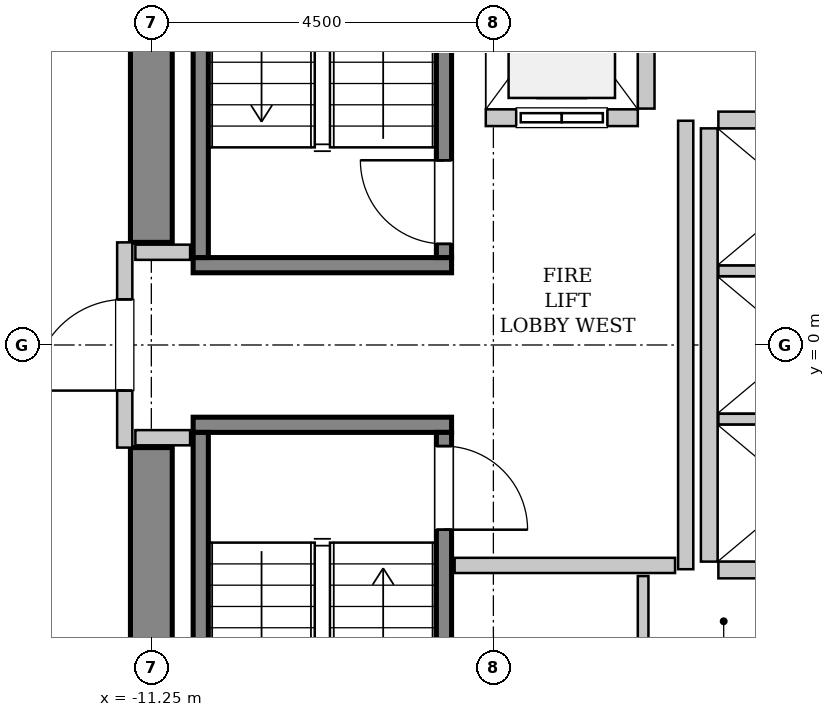
"""IFC4 building model, lengths in metres.
Left out: names, types, materials, properties, quantities, classifications, styles, units other than length and angle.
Written with IfcOpenShell. Run it as: python <this file> out.ifc"""

import sys

from ifc_helpers import new_model, si_unit, direction, frame, frame_2d, origin, place, context, subcontext, project, spatial, rectangle, extrude, source, transform, mapped, element, fill, save


model = new_model("IFC4")
c1 = context("Model", 3, precision=1e-05, world=origin(), true_north=direction((0.0, 1.0)))
c2 = subcontext(c1, "Body", "Model", "MODEL_VIEW")
j1 = project(units=[si_unit("LENGTHUNIT", "METRE"), si_unit("PLANEANGLEUNIT", "RADIAN")], contexts=[c1])
p1 = place(None, origin())
s1 = spatial("IfcSite", under=j1, at=p1, CompositionType="ELEMENT")
p2 = place(p1, origin())
s2 = spatial("IfcBuilding", under=s1, at=p2, CompositionType="ELEMENT")
p3 = place(p2, frame((0.0, 0.0, 179.2)))
s3 = spatial("IfcBuildingStorey", under=s2, at=p3, CompositionType="ELEMENT", Elevation=179.2)
m1 = source(origin(), c2, "Body", "SweptSolid", [
    extrude(rectangle(XDim=7.375, YDim=0.55, at=frame_2d((3.688, 0.0))), origin(), (0.0, 0.0, 1.0), 3.8),
])
for number, where, z_axis, x_axis in (
    (1, (-11.25, -8.725, 0.0), (0.0, 0.0, 1.0), (0.0, 1.0, 0.0)),
    (2, (-11.25, 1.35, 0.0), (0.0, 0.0, 1.0), (0.0, 1.0, 0.0)),
):
    element("IfcWall", number, at=place(p3, frame(where, z_axis=z_axis, x_axis=x_axis)), inside=s3, PredefinedType="SHEAR", context=c2, shape_type="MappedRepresentation", body=[
        mapped(m1, transform((0.0, 0.0, 0.0), x_axis=(1.0, 0.0, 0.0), y_axis=(0.0, 1.0, 0.0), z_axis=(0.0, 0.0, 1.0), scale=1.0)),
    ])
m2 = source(origin(), c2, "Body", "SweptSolid", [
    extrude(rectangle(XDim=3.4, YDim=0.2, at=frame_2d((1.7, 0.0))), origin(), (0.0, 0.0, 1.0), 3.8),
])
p4 = place(p3, frame((-7.3, 1.05, 0.0), z_axis=(0.0, 0.0, 1.0), x_axis=(-1.0, 0.0, 0.0)))
e3 = element("IfcWall", 3, at=p4, inside=s3, PredefinedType="SOLIDWALL", context=c2, shape_type="MappedRepresentation", body=[
    mapped(m2, transform((0.0, 0.0, 0.0), x_axis=(1.0, 0.0, 0.0), y_axis=(0.0, 1.0, 0.0), z_axis=(0.0, 0.0, 1.0), scale=1.0)),
])
m3 = source(origin(), c2, "Body", "SweptSolid", [
    extrude(rectangle(XDim=7.1, YDim=0.2, at=frame_2d((3.55, 0.0))), origin(), (0.0, 0.0, 1.0), 3.8),
])
p5 = place(p3, frame((-7.4, 1.15, 0.0), z_axis=(0.0, 0.0, 1.0), x_axis=(0.0, 1.0, 0.0)))
e4 = element("IfcWall", 4, at=p5, inside=s3, PredefinedType="SOLIDWALL", context=c2, shape_type="MappedRepresentation", body=[
    mapped(m3, transform((0.0, 0.0, 0.0), x_axis=(1.0, 0.0, 0.0), y_axis=(0.0, 1.0, 0.0), z_axis=(0.0, 0.0, 1.0), scale=1.0)),
])
p6 = place(p5, frame((0.18, 0.0, 0.0)))
e5 = element("IfcOpeningElement", 5, at=p6, cuts=e4, PredefinedType="OPENING", context=c2, shape_type="SweptSolid", body=[
    extrude(rectangle(XDim=1.1, YDim=2.15, at=frame_2d((0.55, 1.075))), frame((0.0, 0.11, 0.0), z_axis=(0.0, -1.0, 0.0), x_axis=(1.0, 0.0, 0.0)), (0.0, 0.0, 1.0), 0.22),
])
p7 = place(p3, frame((-10.6, 1.15, 0.0), z_axis=(0.0, 0.0, 1.0), x_axis=(0.0, 1.0, 0.0)))
e6 = element("IfcWall", 6, at=p7, inside=s3, PredefinedType="SOLIDWALL", context=c2, shape_type="MappedRepresentation", body=[
    mapped(m3, transform((0.0, 0.0, 0.0), x_axis=(1.0, 0.0, 0.0), y_axis=(0.0, 1.0, 0.0), z_axis=(0.0, 0.0, 1.0), scale=1.0)),
])
p8 = place(p3, frame((-10.7, -1.05, 0.0), z_axis=(0.0, 0.0, 1.0), x_axis=(1.0, 0.0, 0.0)))
e7 = element("IfcWall", 7, at=p8, inside=s3, PredefinedType="SOLIDWALL", context=c2, shape_type="MappedRepresentation", body=[
    mapped(m2, transform((0.0, 0.0, 0.0), x_axis=(1.0, 0.0, 0.0), y_axis=(0.0, 1.0, 0.0), z_axis=(0.0, 0.0, 1.0), scale=1.0)),
])
p9 = place(p3, frame((-10.6, -1.15, 0.0), z_axis=(0.0, 0.0, 1.0), x_axis=(0.0, -1.0, 0.0)))
e8 = element("IfcWall", 8, at=p9, inside=s3, PredefinedType="SOLIDWALL", context=c2, shape_type="MappedRepresentation", body=[
    mapped(m3, transform((0.0, 0.0, 0.0), x_axis=(1.0, 0.0, 0.0), y_axis=(0.0, 1.0, 0.0), z_axis=(0.0, 0.0, 1.0), scale=1.0)),
])
p10 = place(p3, frame((-7.4, -1.15, 0.0), z_axis=(0.0, 0.0, 1.0), x_axis=(0.0, -1.0, 0.0)))
e9 = element("IfcWall", 9, at=p10, inside=s3, PredefinedType="SOLIDWALL", context=c2, shape_type="MappedRepresentation", body=[
    mapped(m3, transform((0.0, 0.0, 0.0), x_axis=(1.0, 0.0, 0.0), y_axis=(0.0, 1.0, 0.0), z_axis=(0.0, 0.0, 1.0), scale=1.0)),
])
p11 = place(p10, frame((0.18, 0.0, 0.0)))
e10 = element("IfcOpeningElement", 10, at=p11, cuts=e9, PredefinedType="OPENING", context=c2, shape_type="SweptSolid", body=[
    extrude(rectangle(XDim=1.1, YDim=2.15, at=frame_2d((0.55, 1.075))), frame((0.0, 0.11, 0.0), z_axis=(0.0, -1.0, 0.0), x_axis=(1.0, 0.0, 0.0)), (0.0, 0.0, 1.0), 0.22),
])
m4 = source(origin(), c2, "Body", "SweptSolid", [
    extrude(rectangle(XDim=2.0, YDim=0.22, at=frame_2d((1.0, 0.0))), origin(), (0.0, 0.0, 1.0), 3.535),
])
p12 = place(p3, frame((-6.85, 2.99, 0.0), z_axis=(0.0, 0.0, 1.0), x_axis=(1.0, 0.0, 0.0)))
e11 = element("IfcWall", 11, at=p12, inside=s3, PredefinedType="SOLIDWALL", context=c2, shape_type="MappedRepresentation", body=[
    mapped(m4, transform((0.0, 0.0, 0.0), x_axis=(1.0, 0.0, 0.0), y_axis=(0.0, 1.0, 0.0), z_axis=(0.0, 0.0, 1.0), scale=1.0)),
])
p13 = place(p12, frame((0.4, 0.0, 0.0)))
e12 = element("IfcOpeningElement", 12, at=p13, cuts=e11, PredefinedType="OPENING", context=c2, shape_type="SweptSolid", body=[
    extrude(rectangle(XDim=1.2, YDim=2.2, at=frame_2d((0.6, 1.1))), frame((0.0, 0.12, 0.0), z_axis=(0.0, -1.0, 0.0), x_axis=(1.0, 0.0, 0.0)), (0.0, 0.0, 1.0), 0.24),
])
m5 = source(origin(), c2, "Body", "SweptSolid", [
    extrude(rectangle(XDim=2.68, YDim=0.22, at=frame_2d((1.34, 0.0))), origin(), (0.0, 0.0, 1.0), 3.535),
])
p14 = place(p3, frame((-4.74, 3.11, 0.0), z_axis=(0.0, 0.0, 1.0), x_axis=(0.0, 1.0, 0.0)))
e13 = element("IfcWall", 13, at=p14, inside=s3, PredefinedType="SOLIDWALL", context=c2, shape_type="MappedRepresentation", body=[
    mapped(m5, transform((0.0, 0.0, 0.0), x_axis=(1.0, 0.0, 0.0), y_axis=(0.0, 1.0, 0.0), z_axis=(0.0, 0.0, 1.0), scale=1.0)),
])
m6 = source(origin(), c2, "Body", "SweptSolid", [
    extrude(rectangle(XDim=5.7, YDim=0.22, at=frame_2d((2.85, 0.0))), origin(), (0.0, 0.0, 1.0), 3.535),
])
p15 = place(p3, frame((-3.91, 2.85, 0.0), z_axis=(0.0, 0.0, 1.0), x_axis=(0.0, -1.0, 0.0)))
e14 = element("IfcWall", 14, at=p15, inside=s3, PredefinedType="SOLIDWALL", context=c2, shape_type="MappedRepresentation", body=[
    mapped(m6, transform((0.0, 0.0, 0.0), x_axis=(1.0, 0.0, 0.0), y_axis=(0.0, 1.0, 0.0), z_axis=(0.0, 0.0, 1.0), scale=1.0)),
])
m7 = source(origin(), c2, "Body", "SweptSolid", [
    extrude(rectangle(XDim=2.13, YDim=0.22, at=frame_2d((1.065, 0.0))), origin(), (0.0, 0.0, 1.0), 3.535),
])
p16 = place(p3, frame((-3.79, -2.96, 0.0), z_axis=(0.0, 0.0, 1.0), x_axis=(1.0, 0.0, 0.0)))
e15 = element("IfcWall", 15, at=p16, inside=s3, PredefinedType="SOLIDWALL", context=c2, shape_type="MappedRepresentation", body=[
    mapped(m7, transform((0.0, 0.0, 0.0), x_axis=(1.0, 0.0, 0.0), y_axis=(0.0, 1.0, 0.0), z_axis=(0.0, 0.0, 1.0), scale=1.0)),
])
m8 = source(origin(), c2, "Body", "SweptSolid", [
    extrude(rectangle(XDim=2.13, YDim=0.14, at=frame_2d((1.065, 0.0))), origin(), (0.0, 0.0, 1.0), 3.535),
])
for number, where, z_axis, x_axis in (
    (16, (-3.79, -0.975, 0.0), (0.0, 0.0, 1.0), (1.0, 0.0, 0.0)),
    (17, (-3.79, 0.975, 0.0), (0.0, 0.0, 1.0), (1.0, 0.0, 0.0)),
):
    element("IfcWall", number, at=place(p3, frame(where, z_axis=z_axis, x_axis=x_axis)), inside=s3, PredefinedType="PARTITIONING", context=c2, shape_type="MappedRepresentation", body=[
        mapped(m8, transform((0.0, 0.0, 0.0), x_axis=(1.0, 0.0, 0.0), y_axis=(0.0, 1.0, 0.0), z_axis=(0.0, 0.0, 1.0), scale=1.0)),
    ])
p17 = place(p3, frame((-1.66, 2.96, 0.0), z_axis=(0.0, 0.0, 1.0), x_axis=(-1.0, 0.0, 0.0)))
e18 = element("IfcWall", 18, at=p17, inside=s3, PredefinedType="SOLIDWALL", context=c2, shape_type="MappedRepresentation", body=[
    mapped(m7, transform((0.0, 0.0, 0.0), x_axis=(1.0, 0.0, 0.0), y_axis=(0.0, 1.0, 0.0), z_axis=(0.0, 0.0, 1.0), scale=1.0)),
])
m9 = source(origin(), c2, "Body", "SweptSolid", [
    extrude(rectangle(XDim=2.7, YDim=0.2, at=frame_2d((1.35, 0.0))), origin(), (0.0, 0.0, 1.0), 2.425),
])
p18 = place(p3, frame((-11.6, -1.35, 0.0), z_axis=(0.0, 0.0, 1.0), x_axis=(0.0, 1.0, 0.0)))
e19 = element("IfcWall", 19, at=p18, inside=s3, PredefinedType="PARTITIONING", context=c2, shape_type="MappedRepresentation", body=[
    mapped(m9, transform((0.0, 0.0, 0.0), x_axis=(1.0, 0.0, 0.0), y_axis=(0.0, 1.0, 0.0), z_axis=(0.0, 0.0, 1.0), scale=1.0)),
])
p19 = place(p18, frame((0.75, 0.0, 0.0)))
e20 = element("IfcOpeningElement", 20, at=p19, cuts=e19, PredefinedType="OPENING", context=c2, shape_type="SweptSolid", body=[
    extrude(rectangle(XDim=1.2, YDim=2.15, at=frame_2d((0.6, 1.075))), frame((0.0, 0.11, 0.0), z_axis=(0.0, -1.0, 0.0), x_axis=(1.0, 0.0, 0.0)), (0.0, 0.0, 1.0), 0.22),
])
m10 = source(origin(), c2, "Body", "SweptSolid", [
    extrude(rectangle(XDim=5.9, YDim=0.2, at=frame_2d((2.95, 0.0))), origin(), (0.0, 0.0, 1.0), 3.535),
])
p20 = place(p3, frame((-4.22, -2.95, 0.0), z_axis=(0.0, 0.0, 1.0), x_axis=(0.0, 1.0, 0.0)))
e21 = element("IfcWall", 21, at=p20, inside=s3, PredefinedType="PARTITIONING", context=c2, shape_type="MappedRepresentation", body=[
    mapped(m10, transform((0.0, 0.0, 0.0), x_axis=(1.0, 0.0, 0.0), y_axis=(0.0, 1.0, 0.0), z_axis=(0.0, 0.0, 1.0), scale=1.0)),
])
m11 = source(origin(), c2, "Body", "SweptSolid", [
    extrude(rectangle(XDim=2.9, YDim=0.2, at=frame_2d((1.45, 0.0))), origin(), (0.0, 0.0, 1.0), 3.535),
])
p21 = place(p3, frame((-7.26, -2.9, 0.0), z_axis=(0.0, 0.0, 1.0), x_axis=(1.0, 0.0, 0.0)))
e22 = element("IfcWall", 22, at=p21, inside=s3, PredefinedType="PARTITIONING", context=c2, shape_type="MappedRepresentation", body=[
    mapped(m11, transform((0.0, 0.0, 0.0), x_axis=(1.0, 0.0, 0.0), y_axis=(0.0, 1.0, 0.0), z_axis=(0.0, 0.0, 1.0), scale=1.0)),
])
m12 = source(origin(), c2, "Body", "SweptSolid", [
    extrude(rectangle(XDim=0.72, YDim=0.2, at=frame_2d((0.36, 0.0))), origin(), (0.0, 0.0, 1.0), 3.535),
])
for number, where, z_axis, x_axis in (
    (23, (-11.46, 1.22, 0.0), (0.0, 0.0, 1.0), (1.0, 0.0, 0.0)),
    (24, (-11.46, -1.22, 0.0), (0.0, 0.0, 1.0), (1.0, 0.0, 0.0)),
):
    element("IfcWall", number, at=place(p3, frame(where, z_axis=z_axis, x_axis=x_axis)), inside=s3, PredefinedType="PARTITIONING", context=c2, shape_type="MappedRepresentation", body=[
        mapped(m12, transform((0.0, 0.0, 0.0), x_axis=(1.0, 0.0, 0.0), y_axis=(0.0, 1.0, 0.0), z_axis=(0.0, 0.0, 1.0), scale=1.0)),
    ])
m13 = source(origin(), c2, "Body", "SweptSolid", [
    extrude(rectangle(XDim=1.1, YDim=0.14, at=frame_2d((0.55, 0.0))), origin(), (0.0, 0.0, 1.0), 3.535),
])
p22 = place(p3, frame((-4.78, -4.14, 0.0), z_axis=(0.0, 0.0, 1.0), x_axis=(0.0, 1.0, 0.0)))
e25 = element("IfcWall", 25, at=p22, inside=s3, PredefinedType="PARTITIONING", context=c2, shape_type="MappedRepresentation", body=[
    mapped(m13, transform((0.0, 0.0, 0.0), x_axis=(1.0, 0.0, 0.0), y_axis=(0.0, 1.0, 0.0), z_axis=(0.0, 0.0, 1.0), scale=1.0)),
])
m14 = source(origin(), c2, "Body", "SweptSolid", [
    extrude(rectangle(XDim=1.1, YDim=2.15, at=frame_2d((0.55, 1.075))), frame((0.0, 0.025, 0.0), z_axis=(0.0, -1.0, 0.0), x_axis=(1.0, 0.0, 0.0)), (0.0, 0.0, 1.0), 0.05),
])
p23 = place(p6, origin())
e26 = element("IfcDoor", 26, at=p23, inside=s3, OperationType="SINGLE_SWING_RIGHT", PredefinedType="DOOR", context=c2, shape_type="MappedRepresentation", body=[
    mapped(m14, transform((0.0, 0.0, 0.0), x_axis=(1.0, 0.0, 0.0), y_axis=(0.0, 1.0, 0.0), z_axis=(0.0, 0.0, 1.0), scale=1.0)),
])
fill(e5, e26)
p24 = place(p11, origin())
e27 = element("IfcDoor", 27, at=p24, inside=s3, OperationType="SINGLE_SWING_RIGHT", PredefinedType="DOOR", context=c2, shape_type="MappedRepresentation", body=[
    mapped(m14, transform((0.0, 0.0, 0.0), x_axis=(1.0, 0.0, 0.0), y_axis=(0.0, 1.0, 0.0), z_axis=(0.0, 0.0, 1.0), scale=1.0)),
])
fill(e10, e27)
m15 = source(origin(), c2, "Body", "SweptSolid", [
    extrude(rectangle(XDim=1.2, YDim=2.2, at=frame_2d((0.6, 1.1))), frame((0.0, 0.025, 0.0), z_axis=(0.0, -1.0, 0.0), x_axis=(1.0, 0.0, 0.0)), (0.0, 0.0, 1.0), 0.05),
])
p25 = place(p13, origin())
e28 = element("IfcDoor", 28, at=p25, inside=s3, OperationType="SLIDING_TO_LEFT", PredefinedType="DOOR", context=c2, shape_type="MappedRepresentation", body=[
    mapped(m15, transform((0.0, 0.0, 0.0), x_axis=(1.0, 0.0, 0.0), y_axis=(0.0, 1.0, 0.0), z_axis=(0.0, 0.0, 1.0), scale=1.0)),
])
fill(e12, e28)
m16 = source(origin(), c2, "Body", "SweptSolid", [
    extrude(rectangle(XDim=1.2, YDim=2.15, at=frame_2d((0.6, 1.075))), frame((0.0, 0.025, 0.0), z_axis=(0.0, -1.0, 0.0), x_axis=(1.0, 0.0, 0.0)), (0.0, 0.0, 1.0), 0.05),
])
p26 = place(p19, origin())
e29 = element("IfcDoor", 29, at=p26, inside=s3, OperationType="SINGLE_SWING_LEFT", PredefinedType="DOOR", context=c2, shape_type="MappedRepresentation", body=[
    mapped(m16, transform((0.0, 0.0, 0.0), x_axis=(1.0, 0.0, 0.0), y_axis=(0.0, 1.0, 0.0), z_axis=(0.0, 0.0, 1.0), scale=1.0)),
])
fill(e20, e29)
save(model, sys.argv[1])
